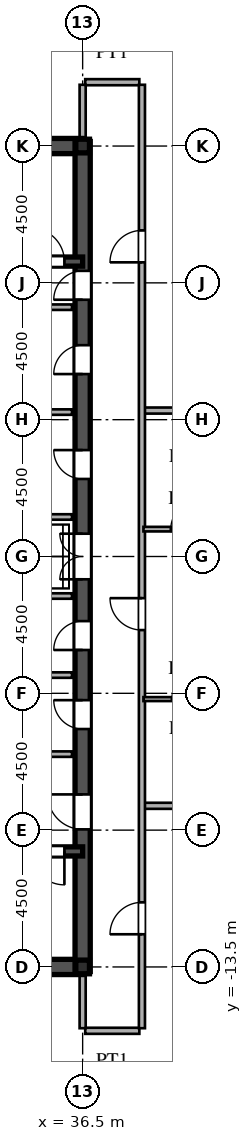
"""IFC4 building model, lengths in metres.
Left out: names, types, materials, properties, quantities, classifications, styles, units other than length and angle.
Written with IfcOpenShell. Run it as: python <this file> out.ifc"""

import sys

from ifc_helpers import new_model, si_unit, direction, frame, frame_2d, origin, origin_2d, place, context, subcontext, project, spatial, rectangle, i_section, extrude, source, transform, mapped, element, fill, save


model = new_model("IFC4")
c1 = context("Model", 3, precision=1e-05, world=origin(), true_north=direction((0.0, 1.0)))
c2 = subcontext(c1, "Body", "Model", "MODEL_VIEW")
j1 = project(units=[si_unit("LENGTHUNIT", "METRE"), si_unit("PLANEANGLEUNIT", "RADIAN")], contexts=[c1])
p1 = place(None, origin())
s1 = spatial("IfcSite", under=j1, at=p1, CompositionType="ELEMENT")
p2 = place(p1, origin())
s2 = spatial("IfcBuilding", under=s1, at=p2, CompositionType="ELEMENT")
p3 = place(p2, frame((0.0, 0.0, 254.4)))
s3 = spatial("IfcBuildingStorey", under=s2, at=p3, CompositionType="ELEMENT", Elevation=254.4)
m1 = source(origin(), c2, "Body", "SweptSolid", [
    extrude(i_section(OverallWidth=0.45, OverallDepth=0.45, WebThickness=0.016, FlangeThickness=0.025, at=origin_2d()), origin(), (0.0, 0.0, 1.0), 3.75),
])
for number, where, z_axis, x_axis in (
    (1, (36.5, -13.5, 0.0), (0.0, 0.0, 1.0), (1.0, 0.0, 0.0)),
    (2, (36.5, 13.5, 0.0), (0.0, 0.0, 1.0), (1.0, 0.0, 0.0)),
):
    element("IfcColumn", number, at=place(p3, frame(where, z_axis=z_axis, x_axis=x_axis)), inside=s3, PredefinedType="COLUMN", context=c2, shape_type="MappedRepresentation", body=[
        mapped(m1, transform((0.0, 0.0, 0.0), scale=1.0)),
    ])
for number, where, z_axis, x_axis in (
    (3, (27.5, -13.5, 0.0), (0.0, 0.0, 1.0), (1.0, 0.0, 0.0)),
    (4, (27.5, 13.5, 0.0), (0.0, 0.0, 1.0), (1.0, 0.0, 0.0)),
):
    element("IfcWall", number, at=place(p3, frame(where, z_axis=z_axis, x_axis=x_axis)), inside=s3, PredefinedType="SHEAR", context=c2, shape_type="SweptSolid", body=[
        extrude(rectangle(XDim=9.0, YDim=0.5, at=frame_2d((4.5, 0.0))), origin(), (0.0, 0.0, 1.0), 3.53),
    ])
p4 = place(p3, frame((36.5, -13.65, 0.0), z_axis=(0.0, 0.0, 1.0), x_axis=(0.0, 1.0, 0.0)))
e5 = element("IfcWall", 5, at=p4, inside=s3, PredefinedType="SHEAR", context=c2, shape_type="SweptSolid", body=[
    extrude(rectangle(XDim=7.15, YDim=0.5, at=frame_2d((3.575, 0.0))), origin(), (0.0, 0.0, 1.0), 3.53),
])
p5 = place(p4, frame((4.675, 0.0, 0.0)))
e6 = element("IfcOpeningElement", 6, at=p5, cuts=e5, PredefinedType="OPENING", context=c2, shape_type="SweptSolid", body=[
    extrude(rectangle(XDim=1.15, YDim=2.2, at=frame_2d((0.575, 1.1))), frame((0.0, 0.26, 0.0), z_axis=(0.0, -1.0, 0.0), x_axis=(1.0, 0.0, 0.0)), (0.0, 0.0, 1.0), 0.52),
])
p6 = place(p3, frame((36.5, -1.3, 0.0), z_axis=(0.0, 0.0, 1.0), x_axis=(0.0, 1.0, 0.0)))
e7 = element("IfcWall", 7, at=p6, inside=s3, PredefinedType="SHEAR", context=c2, shape_type="SweptSolid", body=[
    extrude(rectangle(XDim=2.6, YDim=0.5, at=frame_2d((1.3, 0.0))), origin(), (0.0, 0.0, 1.0), 3.53),
])
p7 = place(p6, frame((0.55, 0.0, 0.0)))
e8 = element("IfcOpeningElement", 8, at=p7, cuts=e7, PredefinedType="OPENING", context=c2, shape_type="SweptSolid", body=[
    extrude(rectangle(XDim=1.5, YDim=2.3, at=frame_2d((0.75, 1.15))), frame((0.0, 0.26, 0.0), z_axis=(0.0, -1.0, 0.0), x_axis=(1.0, 0.0, 0.0)), (0.0, 0.0, 1.0), 0.52),
])
p8 = place(p3, frame((36.5, 8.2, 0.0), z_axis=(0.0, 0.0, 1.0), x_axis=(0.0, 1.0, 0.0)))
e9 = element("IfcWall", 9, at=p8, inside=s3, PredefinedType="SHEAR", context=c2, shape_type="SweptSolid", body=[
    extrude(rectangle(XDim=5.45, YDim=0.5, at=frame_2d((2.725, 0.0))), origin(), (0.0, 0.0, 1.0), 3.53),
])
p9 = place(p8, frame((0.245, 0.0, 0.0)))
e10 = element("IfcOpeningElement", 10, at=p9, cuts=e9, PredefinedType="OPENING", context=c2, shape_type="SweptSolid", body=[
    extrude(rectangle(XDim=0.95, YDim=2.15, at=frame_2d((0.475, 1.075))), frame((0.0, 0.26, 0.0), z_axis=(0.0, -1.0, 0.0), x_axis=(1.0, 0.0, 0.0)), (0.0, 0.0, 1.0), 0.52),
])
p10 = place(p3, frame((36.5, -6.5, 0.0), z_axis=(0.0, 0.0, 1.0), x_axis=(0.0, 1.0, 0.0)))
e11 = element("IfcWall", 11, at=p10, inside=s3, PredefinedType="SHEAR", context=c2, shape_type="SweptSolid", body=[
    extrude(rectangle(XDim=2.6, YDim=0.5, at=frame_2d((1.3, 0.0))), origin(), (0.0, 0.0, 1.0), 3.53),
])
p11 = place(p10, frame((0.825, 0.0, 0.0)))
e12 = element("IfcOpeningElement", 12, at=p11, cuts=e11, PredefinedType="OPENING", context=c2, shape_type="SweptSolid", body=[
    extrude(rectangle(XDim=0.95, YDim=2.15, at=frame_2d((0.475, 1.075))), frame((0.0, 0.26, 0.0), z_axis=(0.0, -1.0, 0.0), x_axis=(1.0, 0.0, 0.0)), (0.0, 0.0, 1.0), 0.52),
])
p12 = place(p3, frame((36.5, -3.9, 0.0), z_axis=(0.0, 0.0, 1.0), x_axis=(0.0, 1.0, 0.0)))
e13 = element("IfcWall", 13, at=p12, inside=s3, PredefinedType="SHEAR", context=c2, shape_type="SweptSolid", body=[
    extrude(rectangle(XDim=2.6, YDim=0.5, at=frame_2d((1.3, 0.0))), origin(), (0.0, 0.0, 1.0), 3.53),
])
p13 = place(p12, frame((0.825, 0.0, 0.0)))
e14 = element("IfcOpeningElement", 14, at=p13, cuts=e13, PredefinedType="OPENING", context=c2, shape_type="SweptSolid", body=[
    extrude(rectangle(XDim=0.95, YDim=2.15, at=frame_2d((0.475, 1.075))), frame((0.0, 0.26, 0.0), z_axis=(0.0, -1.0, 0.0), x_axis=(1.0, 0.0, 0.0)), (0.0, 0.0, 1.0), 0.52),
])
p14 = place(p3, frame((36.5, 1.3, 0.0), z_axis=(0.0, 0.0, 1.0), x_axis=(0.0, 1.0, 0.0)))
e15 = element("IfcWall", 15, at=p14, inside=s3, PredefinedType="SHEAR", context=c2, shape_type="SweptSolid", body=[
    extrude(rectangle(XDim=3.45, YDim=0.5, at=frame_2d((1.725, 0.0))), origin(), (0.0, 0.0, 1.0), 3.53),
])
p15 = place(p14, frame((1.25, 0.0, 0.0)))
e16 = element("IfcOpeningElement", 16, at=p15, cuts=e15, PredefinedType="OPENING", context=c2, shape_type="SweptSolid", body=[
    extrude(rectangle(XDim=0.95, YDim=2.15, at=frame_2d((0.475, 1.075))), frame((0.0, 0.26, 0.0), z_axis=(0.0, -1.0, 0.0), x_axis=(1.0, 0.0, 0.0)), (0.0, 0.0, 1.0), 0.52),
])
p16 = place(p3, frame((36.5, 4.75, 0.0), z_axis=(0.0, 0.0, 1.0), x_axis=(0.0, 1.0, 0.0)))
e17 = element("IfcWall", 17, at=p16, inside=s3, PredefinedType="SHEAR", context=c2, shape_type="SweptSolid", body=[
    extrude(rectangle(XDim=3.45, YDim=0.5, at=frame_2d((1.725, 0.0))), origin(), (0.0, 0.0, 1.0), 3.53),
])
p17 = place(p16, frame((1.25, 0.0, 0.0)))
e18 = element("IfcOpeningElement", 18, at=p17, cuts=e17, PredefinedType="OPENING", context=c2, shape_type="SweptSolid", body=[
    extrude(rectangle(XDim=0.95, YDim=2.15, at=frame_2d((0.475, 1.075))), frame((0.0, 0.26, 0.0), z_axis=(0.0, -1.0, 0.0), x_axis=(1.0, 0.0, 0.0)), (0.0, 0.0, 1.0), 0.52),
])
p18 = place(p3, frame((27.5, -9.7, 0.0), z_axis=(0.0, 0.0, 1.0), x_axis=(1.0, 0.0, 0.0)))
e19 = element("IfcWall", 19, at=p18, inside=s3, PredefinedType="SHEAR", context=c2, shape_type="SweptSolid", body=[
    extrude(rectangle(XDim=9.0, YDim=0.3, at=frame_2d((4.5, 0.0))), origin(), (0.0, 0.0, 1.0), 3.53),
])
p19 = place(p18, frame((7.3, 0.0, 0.0)))
e20 = element("IfcOpeningElement", 20, at=p19, cuts=e19, PredefinedType="OPENING", context=c2, shape_type="SweptSolid", body=[
    extrude(rectangle(XDim=1.1, YDim=2.2, at=frame_2d((0.55, 1.1))), frame((0.0, 0.16, 0.0), z_axis=(0.0, -1.0, 0.0), x_axis=(1.0, 0.0, 0.0)), (0.0, 0.0, 1.0), 0.32),
])
p20 = place(p3, frame((27.5, 9.7, 0.0), z_axis=(0.0, 0.0, 1.0), x_axis=(1.0, 0.0, 0.0)))
e21 = element("IfcWall", 21, at=p20, inside=s3, PredefinedType="SHEAR", context=c2, shape_type="SweptSolid", body=[
    extrude(rectangle(XDim=9.0, YDim=0.3, at=frame_2d((4.5, 0.0))), origin(), (0.0, 0.0, 1.0), 3.53),
])
p21 = place(p20, frame((7.3, 0.0, 0.0)))
e22 = element("IfcOpeningElement", 22, at=p21, cuts=e21, PredefinedType="OPENING", context=c2, shape_type="SweptSolid", body=[
    extrude(rectangle(XDim=1.1, YDim=2.2, at=frame_2d((0.55, 1.1))), frame((0.0, 0.16, 0.0), z_axis=(0.0, -1.0, 0.0), x_axis=(1.0, 0.0, 0.0)), (0.0, 0.0, 1.0), 0.32),
])
for number, where, z_axis, x_axis in (
    (23, (30.45, -6.5, 0.0), (0.0, 0.0, 1.0), (1.0, 0.0, 0.0)),
    (24, (30.45, 8.2, 0.0), (0.0, 0.0, 1.0), (1.0, 0.0, 0.0)),
):
    element("IfcWall", number, at=place(p3, frame(where, z_axis=z_axis, x_axis=x_axis)), inside=s3, PredefinedType="PARTITIONING", context=c2, shape_type="SweptSolid", body=[
        extrude(rectangle(XDim=5.7, YDim=0.18, at=frame_2d((2.85, 0.0))), origin(), (0.0, 0.0, 1.0), 3.53),
    ])
for number, where, z_axis, x_axis in (
    (25, (33.2, -1.3, 0.0), (0.0, 0.0, 1.0), (1.0, 0.0, 0.0)),
    (26, (33.2, 1.3, 0.0), (0.0, 0.0, 1.0), (1.0, 0.0, 0.0)),
    (27, (33.2, -3.9, 0.0), (0.0, 0.0, 1.0), (1.0, 0.0, 0.0)),
    (28, (33.2, 4.75, 0.0), (0.0, 0.0, 1.0), (1.0, 0.0, 0.0)),
):
    element("IfcWall", number, at=place(p3, frame(where, z_axis=z_axis, x_axis=x_axis)), inside=s3, PredefinedType="PARTITIONING", context=c2, shape_type="SweptSolid", body=[
        extrude(rectangle(XDim=2.95, YDim=0.18, at=frame_2d((1.475, 0.0))), origin(), (0.0, 0.0, 1.0), 3.53),
    ])
p22 = place(p3, frame((36.585, -15.6, 0.0), z_axis=(0.0, 0.0, 1.0), x_axis=(1.0, 0.0, 0.0)))
e29 = element("IfcWall", 29, at=p22, inside=s3, PredefinedType="PARTITIONING", context=c2, shape_type="SweptSolid", body=[
    extrude(rectangle(XDim=1.78, YDim=0.2, at=frame_2d((0.89, 0.0))), origin(), (0.0, 0.0, 1.0), 3.53),
])
p23 = place(p3, frame((38.53, -8.2, 0.0), z_axis=(0.0, 0.0, 1.0), x_axis=(1.0, 0.0, 0.0)))
e30 = element("IfcWall", 30, at=p23, inside=s3, PredefinedType="PARTITIONING", context=c2, shape_type="SweptSolid", body=[
    extrude(rectangle(XDim=17.813, YDim=0.2, at=frame_2d((8.906, 0.0))), origin(), (0.0, 0.0, 1.0), 3.53),
])
p24 = place(p3, frame((38.5, -4.69, 0.0), z_axis=(0.0, 0.0, 1.0), x_axis=(1.0, 0.0, 0.0)))
e31 = element("IfcWall", 31, at=p24, inside=s3, PredefinedType="PARTITIONING", context=c2, shape_type="SweptSolid", body=[
    extrude(rectangle(XDim=2.75, YDim=0.13, at=frame_2d((1.375, 0.0))), origin(), (0.0, 0.0, 1.0), 3.53),
])
p25 = place(p24, frame((0.935, 0.0, 0.0)))
e32 = element("IfcOpeningElement", 32, at=p25, cuts=e31, PredefinedType="OPENING", context=c2, shape_type="SweptSolid", body=[
    extrude(rectangle(XDim=0.88, YDim=2.1, at=frame_2d((0.44, 1.05))), frame((0.0, 0.075, 0.0), z_axis=(0.0, -1.0, 0.0), x_axis=(1.0, 0.0, 0.0)), (0.0, 0.0, 1.0), 0.15),
])
p26 = place(p3, frame((38.5, 0.9, 0.0), z_axis=(0.0, 0.0, 1.0), x_axis=(1.0, 0.0, 0.0)))
e33 = element("IfcWall", 33, at=p26, inside=s3, PredefinedType="PARTITIONING", context=c2, shape_type="SweptSolid", body=[
    extrude(rectangle(XDim=2.75, YDim=0.15, at=frame_2d((1.375, 0.0))), origin(), (0.0, 0.0, 1.0), 3.53),
])
p27 = place(p26, frame((0.9, 0.0, 0.0)))
e34 = element("IfcOpeningElement", 34, at=p27, cuts=e33, PredefinedType="OPENING", context=c2, shape_type="SweptSolid", body=[
    extrude(rectangle(XDim=0.95, YDim=2.15, at=frame_2d((0.475, 1.075))), frame((0.0, 0.085, 0.0), z_axis=(0.0, -1.0, 0.0), x_axis=(1.0, 0.0, 0.0)), (0.0, 0.0, 1.0), 0.17),
])
p28 = place(p3, frame((38.53, 4.8, 0.0), z_axis=(0.0, 0.0, 1.0), x_axis=(1.0, 0.0, 0.0)))
e35 = element("IfcWall", 35, at=p28, inside=s3, PredefinedType="PARTITIONING", context=c2, shape_type="SweptSolid", body=[
    extrude(rectangle(XDim=23.48, YDim=0.2, at=frame_2d((11.74, 0.0))), origin(), (0.0, 0.0, 1.0), 3.53),
])
p29 = place(p3, frame((36.585, 15.6, 0.0), z_axis=(0.0, 0.0, 1.0), x_axis=(1.0, 0.0, 0.0)))
e36 = element("IfcWall", 36, at=p29, inside=s3, PredefinedType="PARTITIONING", context=c2, shape_type="SweptSolid", body=[
    extrude(rectangle(XDim=1.78, YDim=0.2, at=frame_2d((0.89, 0.0))), origin(), (0.0, 0.0, 1.0), 3.53),
])
for number, where, z_axis, x_axis in (
    (37, (36.5, -15.515, 0.0), (0.0, 0.0, 1.0), (0.0, 1.0, 0.0)),
    (38, (36.5, 13.755, 0.0), (0.0, 0.0, 1.0), (0.0, 1.0, 0.0)),
):
    element("IfcWall", number, at=place(p3, frame(where, z_axis=z_axis, x_axis=x_axis)), inside=s3, PredefinedType="PARTITIONING", context=c2, shape_type="SweptSolid", body=[
        extrude(rectangle(XDim=1.76, YDim=0.2, at=frame_2d((0.88, 0.0))), origin(), (0.0, 0.0, 1.0), 2.93),
    ])
p30 = place(p3, frame((38.45, -15.515, 0.0), z_axis=(0.0, 0.0, 1.0), x_axis=(0.0, 1.0, 0.0)))
e39 = element("IfcWall", 39, at=p30, inside=s3, PredefinedType="PARTITIONING", context=c2, shape_type="SweptSolid", body=[
    extrude(rectangle(XDim=31.03, YDim=0.2, at=frame_2d((15.515, 0.0))), origin(), (0.0, 0.0, 1.0), 3.53),
])
p31 = place(p30, frame((3.09, 0.0, 0.0)))
e40 = element("IfcOpeningElement", 40, at=p31, cuts=e39, PredefinedType="OPENING", context=c2, shape_type="SweptSolid", body=[
    extrude(rectangle(XDim=1.05, YDim=2.25, at=frame_2d((0.525, 1.125))), frame((0.0, 0.11, 0.0), z_axis=(0.0, -1.0, 0.0), x_axis=(1.0, 0.0, 0.0)), (0.0, 0.0, 1.0), 0.22),
])
p32 = place(p30, frame((13.095, 0.0, 0.0)))
e41 = element("IfcOpeningElement", 41, at=p32, cuts=e39, PredefinedType="OPENING", context=c2, shape_type="SweptSolid", body=[
    extrude(rectangle(XDim=1.05, YDim=2.25, at=frame_2d((0.525, 1.125))), frame((0.0, 0.11, 0.0), z_axis=(0.0, -1.0, 0.0), x_axis=(1.0, 0.0, 0.0)), (0.0, 0.0, 1.0), 0.22),
])
p33 = place(p30, frame((25.19, 0.0, 0.0)))
e42 = element("IfcOpeningElement", 42, at=p33, cuts=e39, PredefinedType="OPENING", context=c2, shape_type="SweptSolid", body=[
    extrude(rectangle(XDim=1.05, YDim=2.25, at=frame_2d((0.525, 1.125))), frame((0.0, 0.11, 0.0), z_axis=(0.0, -1.0, 0.0), x_axis=(1.0, 0.0, 0.0)), (0.0, 0.0, 1.0), 0.22),
])
m2 = source(origin(), c2, "Body", "SweptSolid", [
    extrude(rectangle(XDim=1.15, YDim=2.2, at=frame_2d((0.575, 1.1))), frame((0.0, 0.025, 0.0), z_axis=(0.0, -1.0, 0.0), x_axis=(1.0, 0.0, 0.0)), (0.0, 0.0, 1.0), 0.05),
])
p34 = place(p5, origin())
e43 = element("IfcDoor", 43, at=p34, inside=s3, OperationType="SINGLE_SWING_RIGHT", PredefinedType="DOOR", context=c2, shape_type="MappedRepresentation", body=[
    mapped(m2, transform((0.0, 0.0, 0.0), scale=1.0)),
])
fill(e6, e43)
m3 = source(origin(), c2, "Body", "SweptSolid", [
    extrude(rectangle(XDim=1.5, YDim=2.3, at=frame_2d((0.75, 1.15))), frame((0.0, 0.025, 0.0), z_axis=(0.0, -1.0, 0.0), x_axis=(1.0, 0.0, 0.0)), (0.0, 0.0, 1.0), 0.05),
])
p35 = place(p7, origin())
e44 = element("IfcDoor", 44, at=p35, inside=s3, OperationType="DOUBLE_SWING_LEFT", PredefinedType="DOOR", context=c2, shape_type="MappedRepresentation", body=[
    mapped(m3, transform((0.0, 0.0, 0.0), scale=1.0)),
])
fill(e8, e44)
m4 = source(origin(), c2, "Body", "SweptSolid", [
    extrude(rectangle(XDim=0.95, YDim=2.15, at=frame_2d((0.475, 1.075))), frame((0.0, 0.025, 0.0), z_axis=(0.0, -1.0, 0.0), x_axis=(1.0, 0.0, 0.0)), (0.0, 0.0, 1.0), 0.05),
])
p36 = place(p9, origin())
e45 = element("IfcDoor", 45, at=p36, inside=s3, OperationType="SINGLE_SWING_LEFT", PredefinedType="DOOR", context=c2, shape_type="MappedRepresentation", body=[
    mapped(m4, transform((0.0, 0.0, 0.0), scale=1.0)),
])
fill(e10, e45)
p37 = place(p11, origin())
e46 = element("IfcDoor", 46, at=p37, inside=s3, OperationType="SINGLE_SWING_RIGHT", PredefinedType="DOOR", context=c2, shape_type="MappedRepresentation", body=[
    mapped(m4, transform((0.0, 0.0, 0.0), scale=1.0)),
])
fill(e12, e46)
p38 = place(p13, origin())
e47 = element("IfcDoor", 47, at=p38, inside=s3, OperationType="SINGLE_SWING_LEFT", PredefinedType="DOOR", context=c2, shape_type="MappedRepresentation", body=[
    mapped(m4, transform((0.0, 0.0, 0.0), scale=1.0)),
])
fill(e14, e47)
p39 = place(p15, origin())
e48 = element("IfcDoor", 48, at=p39, inside=s3, OperationType="SINGLE_SWING_RIGHT", PredefinedType="DOOR", context=c2, shape_type="MappedRepresentation", body=[
    mapped(m4, transform((0.0, 0.0, 0.0), scale=1.0)),
])
fill(e16, e48)
p40 = place(p17, origin())
e49 = element("IfcDoor", 49, at=p40, inside=s3, OperationType="SINGLE_SWING_LEFT", PredefinedType="DOOR", context=c2, shape_type="MappedRepresentation", body=[
    mapped(m4, transform((0.0, 0.0, 0.0), scale=1.0)),
])
fill(e18, e49)
m5 = source(origin(), c2, "Body", "SweptSolid", [
    extrude(rectangle(XDim=1.1, YDim=2.2, at=frame_2d((0.55, 1.1))), frame((0.0, 0.025, 0.0), z_axis=(0.0, -1.0, 0.0), x_axis=(1.0, 0.0, 0.0)), (0.0, 0.0, 1.0), 0.05),
])
p41 = place(p19, frame((1.1, 0.0, 0.0), z_axis=(0.0, 0.0, 1.0), x_axis=(-1.0, 0.0, 0.0)))
e50 = element("IfcDoor", 50, at=p41, inside=s3, OperationType="SINGLE_SWING_RIGHT", PredefinedType="DOOR", context=c2, shape_type="MappedRepresentation", body=[
    mapped(m5, transform((0.0, 0.0, 0.0), scale=1.0)),
])
fill(e20, e50)
p42 = place(p21, origin())
e51 = element("IfcDoor", 51, at=p42, inside=s3, OperationType="SINGLE_SWING_LEFT", PredefinedType="DOOR", context=c2, shape_type="MappedRepresentation", body=[
    mapped(m5, transform((0.0, 0.0, 0.0), scale=1.0)),
])
fill(e22, e51)
m6 = source(origin(), c2, "Body", "SweptSolid", [
    extrude(rectangle(XDim=0.88, YDim=2.1, at=frame_2d((0.44, 1.05))), frame((0.0, 0.025, 0.0), z_axis=(0.0, -1.0, 0.0), x_axis=(1.0, 0.0, 0.0)), (0.0, 0.0, 1.0), 0.05),
])
p43 = place(p25, origin())
e52 = element("IfcDoor", 52, at=p43, inside=s3, OperationType="SINGLE_SWING_RIGHT", PredefinedType="DOOR", context=c2, shape_type="MappedRepresentation", body=[
    mapped(m6, transform((0.0, 0.0, 0.0), scale=1.0)),
])
fill(e32, e52)
m7 = source(origin(), c2, "Body", "SweptSolid", [
    extrude(rectangle(XDim=0.95, YDim=2.15, at=frame_2d((0.475, 1.075))), frame((0.0, 0.025, 0.0), z_axis=(0.0, -1.0, 0.0), x_axis=(1.0, 0.0, 0.0)), (0.0, 0.0, 1.0), 0.05),
])
p44 = place(p27, origin())
e53 = element("IfcDoor", 53, at=p44, inside=s3, OperationType="SINGLE_SWING_RIGHT", PredefinedType="DOOR", context=c2, shape_type="MappedRepresentation", body=[
    mapped(m7, transform((0.0, 0.0, 0.0), scale=1.0)),
])
fill(e34, e53)
m8 = source(origin(), c2, "Body", "SweptSolid", [
    extrude(rectangle(XDim=1.05, YDim=2.25, at=frame_2d((0.525, 1.125))), frame((0.0, 0.025, 0.0), z_axis=(0.0, -1.0, 0.0), x_axis=(1.0, 0.0, 0.0)), (0.0, 0.0, 1.0), 0.05),
])
p45 = place(p31, origin())
e54 = element("IfcDoor", 54, at=p45, inside=s3, OperationType="SINGLE_SWING_LEFT", PredefinedType="DOOR", context=c2, shape_type="MappedRepresentation", body=[
    mapped(m8, transform((0.0, 0.0, 0.0), scale=1.0)),
])
fill(e40, e54)
p46 = place(p32, origin())
e55 = element("IfcDoor", 55, at=p46, inside=s3, OperationType="SINGLE_SWING_RIGHT", PredefinedType="DOOR", context=c2, shape_type="MappedRepresentation", body=[
    mapped(m8, transform((0.0, 0.0, 0.0), scale=1.0)),
])
fill(e41, e55)
p47 = place(p33, origin())
e56 = element("IfcDoor", 56, at=p47, inside=s3, OperationType="SINGLE_SWING_LEFT", PredefinedType="DOOR", context=c2, shape_type="MappedRepresentation", body=[
    mapped(m8, transform((0.0, 0.0, 0.0), scale=1.0)),
])
fill(e42, e56)
save(model, sys.argv[1])
